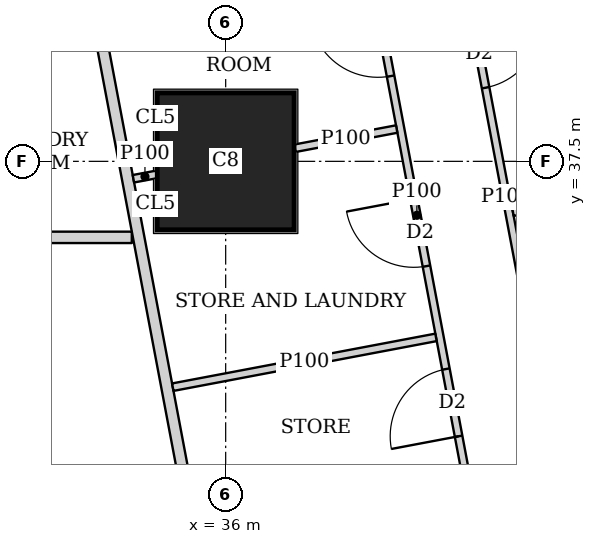
"""IFC4 building model, lengths in metres.
Left out: names, types, materials, properties, quantities, classifications, styles, units other than length and angle.
Written with IfcOpenShell. Run it as: python <this file> out.ifc"""

import sys

from ifc_helpers import new_model, si_unit, direction, frame, frame_2d, origin, origin_2d, place, context, subcontext, project, spatial, rectangle, extrude, element, fill, save


model = new_model("IFC4")
c1 = context("Model", 3, precision=1e-05, world=origin(), true_north=direction((0.0, 1.0)))
c2 = subcontext(c1, "Body", "Model", "MODEL_VIEW")
j1 = project(units=[si_unit("LENGTHUNIT", "METRE"), si_unit("PLANEANGLEUNIT", "RADIAN")], contexts=[c1])
p1 = place(None, origin())
s1 = spatial("IfcSite", under=j1, at=p1, CompositionType="ELEMENT")
p2 = place(p1, origin())
s2 = spatial("IfcBuilding", under=s1, at=p2, CompositionType="ELEMENT")
p3 = place(p2, frame((0.0, 0.0, 65.0)))
s3 = spatial("IfcBuildingStorey", under=s2, at=p3, CompositionType="ELEMENT", Elevation=65.0)
p4 = place(p3, frame((36.0, 37.5, 0.0), z_axis=(0.0, 0.0, 1.0), x_axis=(1.0, 0.0, 0.0)))
e1 = element("IfcColumn", 1, at=p4, inside=s3, PredefinedType="COLUMN", context=c2, shape_type="SweptSolid", body=[
    extrude(rectangle(XDim=1.8, YDim=1.8, at=origin_2d()), origin(), (0.0, 0.0, 1.0), 3.75),
])
p5 = place(p3, frame((8.35, 36.5, 0.0), z_axis=(0.0, 0.0, 1.0), x_axis=(1.0, 0.0, 0.0)))
e2 = element("IfcWall", 2, at=p5, inside=s3, PredefinedType="SOLIDWALL", context=c2, shape_type="SweptSolid", body=[
    extrude(rectangle(XDim=26.415, YDim=0.15, at=frame_2d((13.208, 0.0))), origin(), (0.0, 0.0, 1.0), 3.5),
])
p6 = place(p5, frame((2.6, 0.0, 0.0)))
e3 = element("IfcOpeningElement", 3, at=p6, cuts=e2, PredefinedType="OPENING", context=c2, shape_type="SweptSolid", body=[
    extrude(rectangle(XDim=1.0, YDim=2.1, at=frame_2d((0.5, 1.05))), frame((0.0, 0.085, 0.0), z_axis=(0.0, -1.0, 0.0), x_axis=(1.0, 0.0, 0.0)), (0.0, 0.0, 1.0), 0.17),
])
p7 = place(p5, frame((10.949, 0.0, 0.0)))
e4 = element("IfcOpeningElement", 4, at=p7, cuts=e2, PredefinedType="OPENING", context=c2, shape_type="SweptSolid", body=[
    extrude(rectangle(XDim=1.0, YDim=2.1, at=frame_2d((0.5, 1.05))), frame((0.0, 0.085, 0.0), z_axis=(0.0, -1.0, 0.0), x_axis=(1.0, 0.0, 0.0)), (0.0, 0.0, 1.0), 0.17),
])
p8 = place(p5, frame((18.149, 0.0, 0.0)))
e5 = element("IfcOpeningElement", 5, at=p8, cuts=e2, PredefinedType="OPENING", context=c2, shape_type="SweptSolid", body=[
    extrude(rectangle(XDim=1.0, YDim=2.1, at=frame_2d((0.5, 1.05))), frame((0.0, 0.085, 0.0), z_axis=(0.0, -1.0, 0.0), x_axis=(1.0, 0.0, 0.0)), (0.0, 0.0, 1.0), 0.17),
])
p9 = place(p3, frame((33.68, 42.723, 0.0), z_axis=(0.0, 0.0, 1.0), x_axis=(0.185624129307, -0.98262082342, 0.0)))
e6 = element("IfcWall", 6, at=p9, inside=s3, PredefinedType="SOLIDWALL", context=c2, shape_type="SweptSolid", body=[
    extrude(rectangle(XDim=41.051, YDim=0.15, at=frame_2d((20.526, 0.0))), origin(), (0.0, 0.0, 1.0), 2.5),
])
p10 = place(p9, frame((13.577, 0.0, 0.0)))
e7 = element("IfcOpeningElement", 7, at=p10, cuts=e6, PredefinedType="OPENING", context=c2, shape_type="SweptSolid", body=[
    extrude(rectangle(XDim=1.0, YDim=2.1, at=frame_2d((0.5, 1.05))), frame((0.0, 0.085, 0.0), z_axis=(0.0, -1.0, 0.0), x_axis=(1.0, 0.0, 0.0)), (0.0, 0.0, 1.0), 0.17),
])
p11 = place(p9, frame((17.394, 0.0, 0.0)))
e8 = element("IfcOpeningElement", 8, at=p11, cuts=e6, PredefinedType="OPENING", context=c2, shape_type="SweptSolid", body=[
    extrude(rectangle(XDim=1.0, YDim=2.1, at=frame_2d((0.5, 1.05))), frame((0.0, 0.085, 0.0), z_axis=(0.0, -1.0, 0.0), x_axis=(1.0, 0.0, 0.0)), (0.0, 0.0, 1.0), 0.17),
])
p12 = place(p9, frame((26.758, 0.0, 0.0)))
e9 = element("IfcOpeningElement", 9, at=p12, cuts=e6, PredefinedType="OPENING", context=c2, shape_type="SweptSolid", body=[
    extrude(rectangle(XDim=1.0, YDim=2.1, at=frame_2d((0.5, 1.05))), frame((0.0, 0.085, 0.0), z_axis=(0.0, -1.0, 0.0), x_axis=(1.0, 0.0, 0.0)), (0.0, 0.0, 1.0), 0.17),
])
p13 = place(p9, frame((32.193, 0.0, 0.0)))
e10 = element("IfcOpeningElement", 10, at=p13, cuts=e6, PredefinedType="OPENING", context=c2, shape_type="SweptSolid", body=[
    extrude(rectangle(XDim=1.0, YDim=2.1, at=frame_2d((0.5, 1.05))), frame((0.0, 0.085, 0.0), z_axis=(0.0, -1.0, 0.0), x_axis=(1.0, 0.0, 0.0)), (0.0, 0.0, 1.0), 0.17),
])
p14 = place(p3, frame((38.9, 41.22, 0.0), z_axis=(0.0, 0.0, 1.0), x_axis=(0.185595712897, -0.982626191059, 0.0)))
e11 = element("IfcWall", 11, at=p14, inside=s3, PredefinedType="PARTITIONING", context=c2, shape_type="SweptSolid", body=[
    extrude(rectangle(XDim=8.524, YDim=0.1, at=frame_2d((4.262, 0.0))), origin(), (0.0, 0.0, 1.0), 3.5),
])
p15 = place(p14, frame((7.352, 0.0, 0.0)))
e12 = element("IfcOpeningElement", 12, at=p15, cuts=e11, PredefinedType="OPENING", context=c2, shape_type="SweptSolid", body=[
    extrude(rectangle(XDim=0.9, YDim=2.1, at=frame_2d((0.45, 1.05))), frame((0.0, 0.06, 0.0), z_axis=(0.0, -1.0, 0.0), x_axis=(1.0, 0.0, 0.0)), (0.0, 0.0, 1.0), 0.12),
])
p16 = place(p14, frame((1.9, 0.0, 0.0)))
e13 = element("IfcOpeningElement", 13, at=p16, cuts=e11, PredefinedType="OPENING", context=c2, shape_type="SweptSolid", body=[
    extrude(rectangle(XDim=0.9, YDim=2.1, at=frame_2d((0.45, 1.05))), frame((0.0, 0.06, 0.0), z_axis=(0.0, -1.0, 0.0), x_axis=(1.0, 0.0, 0.0)), (0.0, 0.0, 1.0), 0.12),
])
p17 = place(p3, frame((37.515, 42.089, 0.0), z_axis=(0.0, 0.0, 1.0), x_axis=(0.185565000991, -0.982631991341, 0.0)))
e14 = element("IfcWall", 14, at=p17, inside=s3, PredefinedType="PARTITIONING", context=c2, shape_type="SweptSolid", body=[
    extrude(rectangle(XDim=10.784, YDim=0.1, at=frame_2d((5.392, 0.0))), origin(), (0.0, 0.0, 1.0), 3.5),
])
p18 = place(p17, frame((9.358, 0.0, 0.0)))
e15 = element("IfcOpeningElement", 15, at=p18, cuts=e14, PredefinedType="OPENING", context=c2, shape_type="SweptSolid", body=[
    extrude(rectangle(XDim=0.9, YDim=2.1, at=frame_2d((0.45, 1.05))), frame((0.0, 0.06, 0.0), z_axis=(0.0, -1.0, 0.0), x_axis=(1.0, 0.0, 0.0)), (0.0, 0.0, 1.0), 0.12),
])
p19 = place(p17, frame((5.173, 0.0, 0.0)))
e16 = element("IfcOpeningElement", 16, at=p19, cuts=e14, PredefinedType="OPENING", context=c2, shape_type="SweptSolid", body=[
    extrude(rectangle(XDim=0.9, YDim=2.1, at=frame_2d((0.45, 1.05))), frame((0.0, 0.06, 0.0), z_axis=(0.0, -1.0, 0.0), x_axis=(1.0, 0.0, 0.0)), (0.0, 0.0, 1.0), 0.12),
])
p20 = place(p17, frame((2.629, 0.0, 0.0)))
e17 = element("IfcOpeningElement", 17, at=p20, cuts=e14, PredefinedType="OPENING", context=c2, shape_type="SweptSolid", body=[
    extrude(rectangle(XDim=0.9, YDim=2.1, at=frame_2d((0.45, 1.05))), frame((0.0, 0.06, 0.0), z_axis=(0.0, -1.0, 0.0), x_axis=(1.0, 0.0, 0.0)), (0.0, 0.0, 1.0), 0.12),
])
p21 = place(p17, frame((7.451, 0.0, 0.0)))
e18 = element("IfcOpeningElement", 18, at=p21, cuts=e14, PredefinedType="OPENING", context=c2, shape_type="SweptSolid", body=[
    extrude(rectangle(XDim=0.9, YDim=2.1, at=frame_2d((0.45, 1.05))), frame((0.0, 0.06, 0.0), z_axis=(0.0, -1.0, 0.0), x_axis=(1.0, 0.0, 0.0)), (0.0, 0.0, 1.0), 0.12),
])
p22 = place(p3, frame((40.654, 36.996, 0.0), z_axis=(0.0, 0.0, 1.0), x_axis=(-0.982635224332, -0.185547880349, 0.0)))
e19 = element("IfcWall", 19, at=p22, inside=s3, PredefinedType="PARTITIONING", context=c2, shape_type="SweptSolid", body=[
    extrude(rectangle(XDim=0.889, YDim=0.1, at=frame_2d((0.445, 0.0))), origin(), (0.0, 0.0, 1.0), 3.5),
])
p23 = place(p3, frame((38.25, 37.925, 0.0), z_axis=(0.0, 0.0, 1.0), x_axis=(-0.982650574676, -0.185466568658, 0.0)))
e20 = element("IfcWall", 20, at=p23, inside=s3, PredefinedType="PARTITIONING", context=c2, shape_type="SweptSolid", body=[
    extrude(rectangle(XDim=1.364, YDim=0.1, at=frame_2d((0.682, 0.0))), origin(), (0.0, 0.0, 1.0), 3.5),
])
p24 = place(p3, frame((35.09, 37.328, 0.0), z_axis=(0.0, 0.0, 1.0), x_axis=(-0.982961380226, -0.183812200315, 0.0)))
e21 = element("IfcWall", 21, at=p24, inside=s3, PredefinedType="PARTITIONING", context=c2, shape_type="SweptSolid", body=[
    extrude(rectangle(XDim=0.31, YDim=0.1, at=frame_2d((0.155, 0.0))), origin(), (0.0, 0.0, 1.0), 3.5),
])
p25 = place(p3, frame((38.767, 35.184, 0.0), z_axis=(0.0, 0.0, 1.0), x_axis=(-0.982578451485, -0.185848289414, 0.0)))
e22 = element("IfcWall", 22, at=p25, inside=s3, PredefinedType="PARTITIONING", context=c2, shape_type="SweptSolid", body=[
    extrude(rectangle(XDim=3.525, YDim=0.1, at=frame_2d((1.762, 0.0))), origin(), (0.0, 0.0, 1.0), 3.5),
])
p26 = place(p3, frame((36.861, 15.913, 0.0), z_axis=(0.0, 0.0, 1.0), x_axis=(-0.185588307143, 0.982627589808, 0.0)))
e23 = element("IfcWall", 23, at=p26, inside=s3, PredefinedType="PARTITIONING", context=c2, shape_type="SweptSolid", body=[
    extrude(rectangle(XDim=19.005, YDim=0.125, at=frame_2d((9.502, 0.0))), origin(), (0.0, 0.0, 1.0), 2.5),
])
p27 = place(p26, frame((7.527, 0.0, 0.0)))
e24 = element("IfcOpeningElement", 24, at=p27, cuts=e23, PredefinedType="OPENING", context=c2, shape_type="SweptSolid", body=[
    extrude(rectangle(XDim=1.0, YDim=2.1, at=frame_2d((0.5, 1.05))), frame((0.0, 0.073, 0.0), z_axis=(0.0, -1.0, 0.0), x_axis=(1.0, 0.0, 0.0)), (0.0, 0.0, 1.0), 0.145),
])
p28 = place(p26, frame((15.5, 0.0, 0.0)))
e25 = element("IfcOpeningElement", 25, at=p28, cuts=e23, PredefinedType="OPENING", context=c2, shape_type="SweptSolid", body=[
    extrude(rectangle(XDim=1.0, YDim=2.1, at=frame_2d((0.5, 1.05))), frame((0.0, 0.073, 0.0), z_axis=(0.0, -1.0, 0.0), x_axis=(1.0, 0.0, 0.0)), (0.0, 0.0, 1.0), 0.145),
])
p29 = place(p26, frame((17.602, 0.0, 0.0)))
e26 = element("IfcOpeningElement", 26, at=p29, cuts=e23, PredefinedType="OPENING", context=c2, shape_type="SweptSolid", body=[
    extrude(rectangle(XDim=1.0, YDim=2.1, at=frame_2d((0.5, 1.05))), frame((0.0, 0.073, 0.0), z_axis=(0.0, -1.0, 0.0), x_axis=(1.0, 0.0, 0.0)), (0.0, 0.0, 1.0), 0.145),
])
p30 = place(p16, origin())
e27 = element("IfcDoor", 27, at=p30, inside=s3, OperationType="SINGLE_SWING_LEFT", PredefinedType="DOOR", context=c2, shape_type="SweptSolid", body=[
    extrude(rectangle(XDim=0.9, YDim=2.1, at=frame_2d((0.45, 1.05))), frame((0.0, 0.025, 0.0), z_axis=(0.0, -1.0, 0.0), x_axis=(1.0, 0.0, 0.0)), (0.0, 0.0, 1.0), 0.05),
])
fill(e13, e27)
p31 = place(p19, origin())
e28 = element("IfcDoor", 28, at=p31, inside=s3, OperationType="SINGLE_SWING_RIGHT", PredefinedType="DOOR", context=c2, shape_type="SweptSolid", body=[
    extrude(rectangle(XDim=0.9, YDim=2.1, at=frame_2d((0.45, 1.05))), frame((0.0, 0.025, 0.0), z_axis=(0.0, -1.0, 0.0), x_axis=(1.0, 0.0, 0.0)), (0.0, 0.0, 1.0), 0.05),
])
fill(e16, e28)
p32 = place(p20, origin())
e29 = element("IfcDoor", 29, at=p32, inside=s3, OperationType="SINGLE_SWING_RIGHT", PredefinedType="DOOR", context=c2, shape_type="SweptSolid", body=[
    extrude(rectangle(XDim=0.9, YDim=2.1, at=frame_2d((0.45, 1.05))), frame((0.0, 0.025, 0.0), z_axis=(0.0, -1.0, 0.0), x_axis=(1.0, 0.0, 0.0)), (0.0, 0.0, 1.0), 0.05),
])
fill(e17, e29)
p33 = place(p21, origin())
e30 = element("IfcDoor", 30, at=p33, inside=s3, OperationType="SINGLE_SWING_LEFT", PredefinedType="DOOR", context=c2, shape_type="SweptSolid", body=[
    extrude(rectangle(XDim=0.9, YDim=2.1, at=frame_2d((0.45, 1.05))), frame((0.0, 0.025, 0.0), z_axis=(0.0, -1.0, 0.0), x_axis=(1.0, 0.0, 0.0)), (0.0, 0.0, 1.0), 0.05),
])
fill(e18, e30)
save(model, sys.argv[1])
